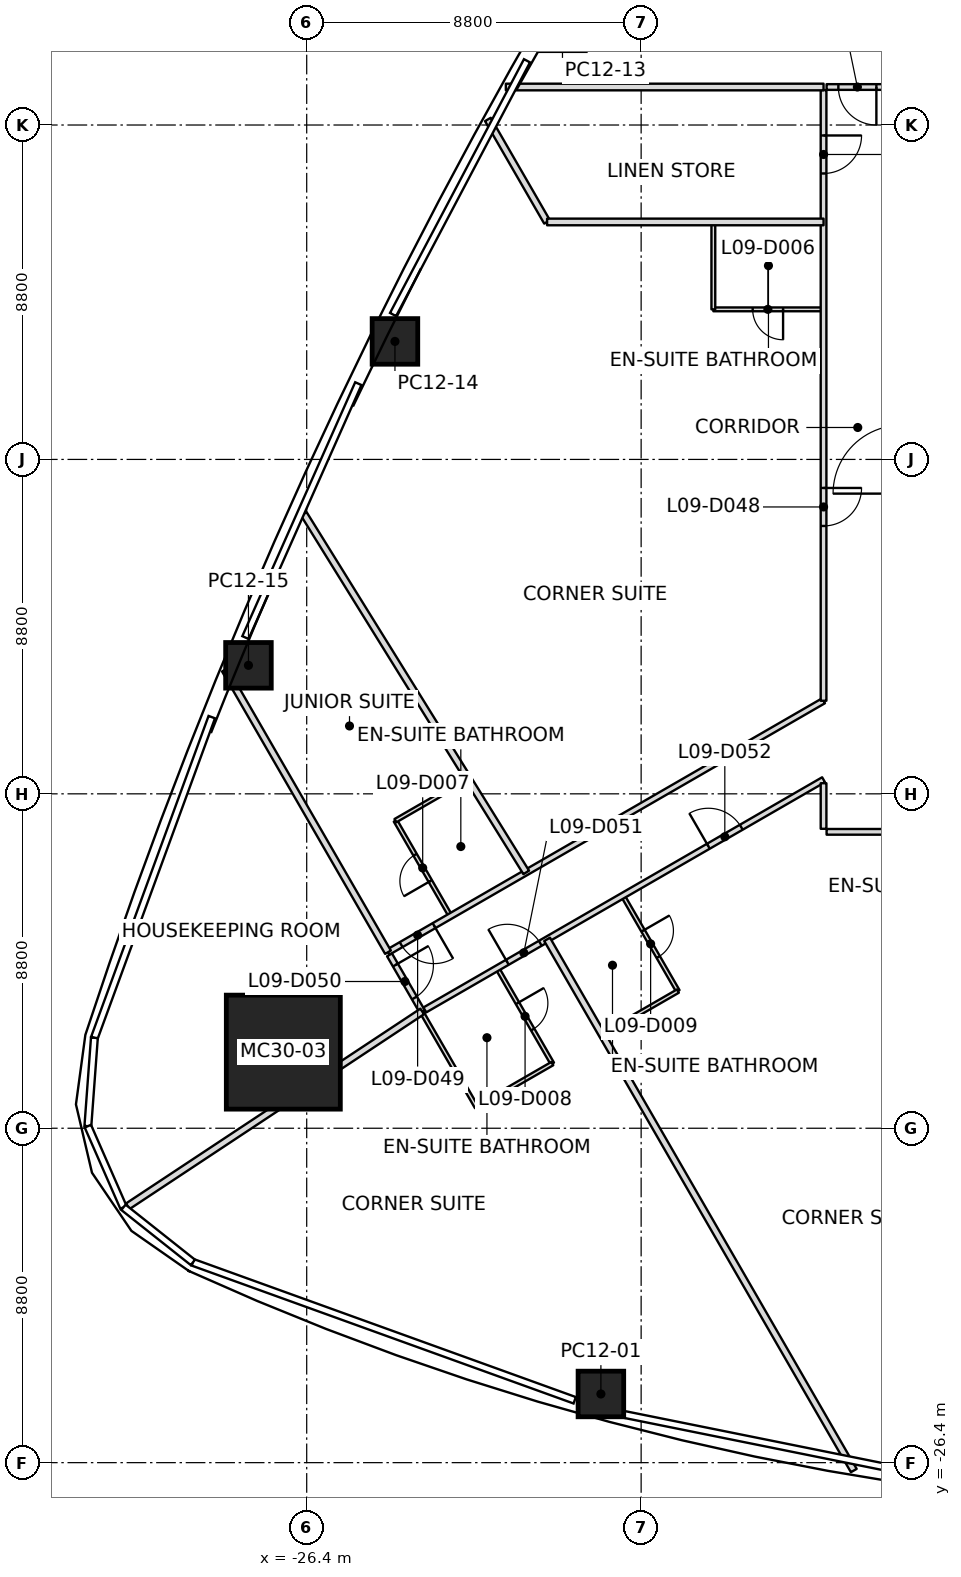
"""IFC4 building model, lengths in metres.
Left out: names, types, materials, properties, quantities, classifications, styles, units other than length and angle.
Written with IfcOpenShell. Run it as: python <this file> out.ifc"""

import sys

from ifc_helpers import new_model, si_unit, direction, frame, frame_2d, origin, origin_2d, place, context, subcontext, project, spatial, rectangle, extrude, clip, halfspace, element, fill, save


model = new_model("IFC4")
c1 = context("Model", 3, precision=1e-05, world=origin(), true_north=direction((0.0, 1.0)))
c2 = subcontext(c1, "Body", "Model", "MODEL_VIEW")
j1 = project(units=[si_unit("LENGTHUNIT", "METRE"), si_unit("PLANEANGLEUNIT", "RADIAN")], contexts=[c1])
p1 = place(None, origin())
s1 = spatial("IfcSite", under=j1, at=p1, CompositionType="ELEMENT")
p2 = place(p1, origin())
s2 = spatial("IfcBuilding", under=s1, at=p2, CompositionType="ELEMENT")
p3 = place(p2, frame((0.0, 0.0, 55.4)))
s3 = spatial("IfcBuildingStorey", under=s2, at=p3, CompositionType="ELEMENT", Elevation=55.4)
p4 = place(p3, frame((-27.015, -15.597, 0.0), z_axis=(0.030595822255, 0.017671724923, 0.999375607967), x_axis=(0.999531838243, -0.000540934199, -0.030591040022)))
e1 = element("IfcColumn", 1, at=p4, inside=s3, PredefinedType="COLUMN", context=c2, shape_type="SweptSolid", body=[
    extrude(rectangle(XDim=3.0, YDim=3.0, at=origin_2d()), origin(), (0.0, 0.0, 1.0), 3.702),
])
p5 = place(p3, frame((-18.659, -24.593, 0.0), z_axis=(0.018962740175, 0.175794991964, 0.984244144146), x_axis=(-0.964231408406, 0.26352619053, -0.028491015209)))
e2 = element("IfcColumn", 2, at=p5, inside=s3, PredefinedType="COLUMN", context=c2, shape_type="SweptSolid", body=[
    clip(clip(extrude(rectangle(XDim=1.2, YDim=1.2, at=origin_2d()), origin(), (0.0, 0.0, 1.0), 3.76), halfspace(frame((0.0, 0.0, 0.001)), True)), halfspace(frame((0.0, 0.0, 3.759)), False)),
])
p6 = place(p3, frame((-19.67, 11.356, 0.0), z_axis=(0.010688020009, -0.006201690622, 0.999923649716), x_axis=(0.499971440741, 0.866041891424, 2.7221193e-05)))
e3 = element("IfcColumn", 3, at=p6, inside=s3, PredefinedType="COLUMN", context=c2, shape_type="SweptSolid", body=[
    extrude(rectangle(XDim=1.2, YDim=1.2, at=origin_2d()), origin(), (0.0, 0.0, 1.0), 3.7),
])
p7 = place(p3, frame((-24.078, 3.105, 0.0), z_axis=(0.0153715921, 0.00230903744, 0.999879183953), x_axis=(0.441818489924, 0.897060674508, -0.00886387119)))
e4 = element("IfcColumn", 4, at=p7, inside=s3, PredefinedType="COLUMN", context=c2, shape_type="SweptSolid", body=[
    extrude(rectangle(XDim=1.2, YDim=1.2, at=origin_2d()), origin(), (0.0, 0.0, 1.0), 3.701),
])
p8 = place(p3, frame((-27.933, -5.418, 0.0), z_axis=(0.019459371732, 0.011015983319, 0.999749959221), x_axis=(0.381749906574, 0.924097828084, -0.017612863535)))
e5 = element("IfcColumn", 5, at=p8, inside=s3, PredefinedType="COLUMN", context=c2, shape_type="SweptSolid", body=[
    extrude(rectangle(XDim=1.2, YDim=1.2, at=origin_2d()), origin(), (0.0, 0.0, 1.0), 3.701),
])
p9 = place(p3, frame((-31.108, -19.653, 0.0), z_axis=(0.0, 0.0, 1.0), x_axis=(0.833961909898, 0.55182201192, 0.0)))
e6 = element("IfcWall", 6, at=p9, inside=s3, PredefinedType="PARTITIONING", context=c2, shape_type="SweptSolid", body=[
    extrude(rectangle(XDim=9.289, YDim=0.175, at=frame_2d((4.645, 0.0))), origin(), (0.0, 0.0, 1.0), 2.784),
])
p10 = place(p3, frame((-24.261, -12.968, 0.0), z_axis=(0.0, 0.0, 1.0), x_axis=(-0.500006467099, 0.866021669971, 0.0)))
e7 = element("IfcWall", 7, at=p10, inside=s3, PredefinedType="PARTITIONING", context=c2, shape_type="SweptSolid", body=[
    extrude(rectangle(XDim=8.582, YDim=0.175, at=frame_2d((4.291, 0.0))), origin(), (0.0, 0.0, 1.0), 2.784),
])
p11 = place(p3, frame((-20.624, -10.868, 0.0), z_axis=(0.0, 0.0, 1.0), x_axis=(-0.527163606433, 0.849763809569, 0.0)))
e8 = element("IfcWall", 8, at=p11, inside=s3, PredefinedType="PARTITIONING", context=c2, shape_type="SweptSolid", body=[
    extrude(rectangle(XDim=11.103, YDim=0.175, at=frame_2d((5.551, 0.0))), origin(), (0.0, 0.0, 1.0), 2.784),
])
p12 = place(p3, frame((-21.632, 8.947, 0.0), z_axis=(0.0, 0.0, 1.0), x_axis=(0.499991586322, -0.866030261369, 0.0)))
e9 = element("IfcWall", 9, at=p12, inside=s3, PredefinedType="PARTITIONING", context=c2, shape_type="SweptSolid", body=[
    extrude(rectangle(XDim=3.115, YDim=0.175, at=frame_2d((1.557, 0.0))), origin(), (0.0, 0.0, 1.0), 2.784),
])
p13 = place(p3, frame((-20.075, 6.249, 0.0), z_axis=(0.0, 0.0, 1.0), x_axis=(1.0, 0.0, 0.0)))
e10 = element("IfcWall", 10, at=p13, inside=s3, PredefinedType="PARTITIONING", context=c2, shape_type="SweptSolid", body=[
    extrude(rectangle(XDim=7.275, YDim=0.175, at=frame_2d((3.637, 0.0))), origin(), (0.0, 0.0, 1.0), 2.943),
])
p14 = place(p3, frame((-12.8, 9.8, 0.0), z_axis=(0.0, 0.0, 1.0), x_axis=(-1.0, 0.0, 0.0)))
e11 = element("IfcWall", 11, at=p14, inside=s3, PredefinedType="PARTITIONING", context=c2, shape_type="SweptSolid", body=[
    extrude(rectangle(XDim=8.36, YDim=0.175, at=frame_2d((4.18, 0.0))), origin(), (0.0, 0.0, 1.0), 2.784),
])
p15 = place(p3, frame((-20.075, -12.629, 0.0), z_axis=(0.0, 0.0, 1.0), x_axis=(0.499997848404, -0.866026646006, 0.0)))
e12 = element("IfcWall", 12, at=p15, inside=s3, PredefinedType="PARTITIONING", context=c2, shape_type="SweptSolid", body=[
    extrude(rectangle(XDim=16.141, YDim=0.175, at=frame_2d((8.07, 0.0))), origin(), (0.0, 0.0, 1.0), 2.784),
])
p16 = place(p3, frame((-12.8, -6.351, 0.0), z_axis=(0.0, 0.0, 1.0), x_axis=(-0.866018462269, -0.500012022864, 0.0)))
e13 = element("IfcWall", 13, at=p16, inside=s3, PredefinedType="PARTITIONING", context=c2, shape_type="SweptSolid", body=[
    extrude(rectangle(XDim=13.234, YDim=0.15, at=frame_2d((6.617, 0.0))), origin(), (0.0, 0.0, 1.0), 2.797),
])
p17 = place(p16, frame((11.834, 0.0, 0.0)))
e14 = element("IfcOpeningElement", 14, at=p17, cuts=e13, PredefinedType="OPENING", context=c2, shape_type="SweptSolid", body=[
    extrude(rectangle(XDim=1.0, YDim=2.1, at=frame_2d((0.5, 1.05))), frame((0.0, 0.075, 0.0), z_axis=(0.0, -1.0, 0.0), x_axis=(1.0, 0.0, 0.0)), (0.0, 0.0, 1.0), 0.15),
])
p18 = place(p3, frame((-24.221, -13.037, 0.0), z_axis=(0.0, 0.0, 1.0), x_axis=(0.499955923987, -0.866050849587, 0.0)))
e15 = element("IfcWall", 15, at=p18, inside=s3, PredefinedType="PARTITIONING", context=c2, shape_type="SweptSolid", body=[
    extrude(rectangle(XDim=1.72, YDim=0.15, at=frame_2d((0.86, 0.0))), origin(), (0.0, 0.0, 1.0), 2.797),
])
p19 = place(p18, frame((0.31, 0.0, 0.0)))
e16 = element("IfcOpeningElement", 16, at=p19, cuts=e15, PredefinedType="OPENING", context=c2, shape_type="SweptSolid", body=[
    extrude(rectangle(XDim=1.0, YDim=2.1, at=frame_2d((0.5, 1.05))), frame((0.0, 0.075, 0.0), z_axis=(0.0, -1.0, 0.0), x_axis=(1.0, 0.0, 0.0)), (0.0, 0.0, 1.0), 0.15),
])
p20 = place(p3, frame((-23.292, -14.487, 0.0), z_axis=(0.0, 0.0, 1.0), x_axis=(0.866017117934, 0.50001435124, 0.0)))
e17 = element("IfcWall", 17, at=p20, inside=s3, PredefinedType="PARTITIONING", context=c2, shape_type="SweptSolid", body=[
    extrude(rectangle(XDim=12.115, YDim=0.15, at=frame_2d((6.058, 0.0))), origin(), (0.0, 0.0, 1.0), 2.797),
])
p21 = place(p20, frame((2.507, 0.0, 0.0)))
e18 = element("IfcOpeningElement", 18, at=p21, cuts=e17, PredefinedType="OPENING", context=c2, shape_type="SweptSolid", body=[
    extrude(rectangle(XDim=1.0, YDim=2.1, at=frame_2d((0.5, 1.05))), frame((0.0, 0.075, 0.0), z_axis=(0.0, -1.0, 0.0), x_axis=(1.0, 0.0, 0.0)), (0.0, 0.0, 1.0), 0.15),
])
p22 = place(p20, frame((8.615, 0.0, 0.0)))
e19 = element("IfcOpeningElement", 19, at=p22, cuts=e17, PredefinedType="OPENING", context=c2, shape_type="SweptSolid", body=[
    extrude(rectangle(XDim=1.0, YDim=2.1, at=frame_2d((0.5, 1.05))), frame((0.0, 0.075, 0.0), z_axis=(0.0, -1.0, 0.0), x_axis=(1.0, 0.0, 0.0)), (0.0, 0.0, 1.0), 0.15),
])
p23 = place(p3, frame((-12.8, -8.521, 0.0), z_axis=(0.0, 0.0, 1.0), x_axis=(0.0, -1.0, 0.0)))
e20 = element("IfcWall", 20, at=p23, inside=s3, PredefinedType="PARTITIONING", context=c2, shape_type="SweptSolid", body=[
    extrude(rectangle(XDim=1.199, YDim=0.15, at=frame_2d((0.6, 0.0))), origin(), (0.0, 0.0, 1.0), 2.797),
])
p24 = place(p3, frame((-12.8, 9.72, 0.0), z_axis=(0.0, 0.0, 1.0), x_axis=(0.0, -1.0, 0.0)))
e21 = element("IfcWall", 21, at=p24, inside=s3, PredefinedType="PARTITIONING", context=c2, shape_type="SweptSolid", body=[
    extrude(rectangle(XDim=16.071, YDim=0.15, at=frame_2d((8.035, 0.0))), origin(), (0.0, 0.0, 1.0), 2.867),
])
p25 = place(p24, frame((1.195, 0.0, 0.0)))
e22 = element("IfcOpeningElement", 22, at=p25, cuts=e21, PredefinedType="OPENING", context=c2, shape_type="SweptSolid", body=[
    extrude(rectangle(XDim=1.0, YDim=2.1, at=frame_2d((0.5, 1.05))), frame((0.0, 0.075, 0.0), z_axis=(0.0, -1.0, 0.0), x_axis=(1.0, 0.0, 0.0)), (0.0, 0.0, 1.0), 0.15),
])
p26 = place(p24, frame((10.471, 0.0, 0.0)))
e23 = element("IfcOpeningElement", 23, at=p26, cuts=e21, PredefinedType="OPENING", context=c2, shape_type="SweptSolid", body=[
    extrude(rectangle(XDim=1.0, YDim=2.1, at=frame_2d((0.5, 1.05))), frame((0.0, 0.075, 0.0), z_axis=(0.0, -1.0, 0.0), x_axis=(1.0, 0.0, 0.0)), (0.0, 0.0, 1.0), 0.15),
])
p27 = place(p3, frame((-12.72, -9.8, 0.0), z_axis=(0.0, 0.0, 1.0), x_axis=(1.0, 0.0, 0.0)))
e24 = element("IfcWall", 24, at=p27, inside=s3, PredefinedType="PARTITIONING", context=c2, shape_type="SweptSolid", body=[
    extrude(rectangle(XDim=25.44, YDim=0.15, at=frame_2d((12.72, 0.0))), origin(), (0.0, 0.0, 1.0), 2.797),
])
p28 = place(p27, frame((7.32, 0.0, 0.0)))
e25 = element("IfcOpeningElement", 25, at=p28, cuts=e24, PredefinedType="OPENING", context=c2, shape_type="SweptSolid", body=[
    extrude(rectangle(XDim=1.0, YDim=2.1, at=frame_2d((0.5, 1.05))), frame((0.0, 0.075, 0.0), z_axis=(0.0, -1.0, 0.0), x_axis=(1.0, 0.0, 0.0)), (0.0, 0.0, 1.0), 0.15),
])
p29 = place(p27, frame((11.52, 0.0, 0.0)))
e26 = element("IfcOpeningElement", 26, at=p29, cuts=e24, PredefinedType="OPENING", context=c2, shape_type="SweptSolid", body=[
    extrude(rectangle(XDim=1.0, YDim=2.1, at=frame_2d((0.5, 1.05))), frame((0.0, 0.075, 0.0), z_axis=(0.0, -1.0, 0.0), x_axis=(1.0, 0.0, 0.0)), (0.0, 0.0, 1.0), 0.15),
])
p30 = place(p27, frame((15.72, 0.0, 0.0)))
e27 = element("IfcOpeningElement", 27, at=p30, cuts=e24, PredefinedType="OPENING", context=c2, shape_type="SweptSolid", body=[
    extrude(rectangle(XDim=1.0, YDim=2.1, at=frame_2d((0.5, 1.05))), frame((0.0, 0.075, 0.0), z_axis=(0.0, -1.0, 0.0), x_axis=(1.0, 0.0, 0.0)), (0.0, 0.0, 1.0), 0.15),
])
p31 = place(p27, frame((19.92, 0.0, 0.0)))
e28 = element("IfcOpeningElement", 28, at=p31, cuts=e24, PredefinedType="OPENING", context=c2, shape_type="SweptSolid", body=[
    extrude(rectangle(XDim=1.0, YDim=2.1, at=frame_2d((0.5, 1.05))), frame((0.0, 0.075, 0.0), z_axis=(0.0, -1.0, 0.0), x_axis=(1.0, 0.0, 0.0)), (0.0, 0.0, 1.0), 0.15),
])
p32 = place(p3, frame((-4.48, 9.8, 0.0), z_axis=(0.0, 0.0, 1.0), x_axis=(-1.0, 0.0, 0.0)))
e29 = element("IfcWall", 29, at=p32, inside=s3, PredefinedType="PARTITIONING", context=c2, shape_type="SweptSolid", body=[
    extrude(rectangle(XDim=8.24, YDim=0.15, at=frame_2d((4.12, 0.0))), origin(), (0.0, 0.0, 1.0), 2.943),
])
p33 = place(p32, frame((6.93, 0.0, 0.0)))
e30 = element("IfcOpeningElement", 30, at=p33, cuts=e29, PredefinedType="OPENING", context=c2, shape_type="SweptSolid", body=[
    extrude(rectangle(XDim=1.0, YDim=2.1, at=frame_2d((0.5, 1.05))), frame((0.0, 0.075, 0.0), z_axis=(0.0, -1.0, 0.0), x_axis=(1.0, 0.0, 0.0)), (0.0, 0.0, 1.0), 0.15),
])
p34 = place(p3, frame((-21.372, -13.413, 0.0), z_axis=(0.0, 0.0, 1.0), x_axis=(0.499999802827, -0.866025517622, 0.0)))
e31 = element("IfcWall", 31, at=p34, inside=s3, PredefinedType="PARTITIONING", context=c2, shape_type="SweptSolid", body=[
    extrude(rectangle(XDim=2.87, YDim=0.1, at=frame_2d((1.435, 0.0))), origin(), (0.0, 0.0, 1.0), 3.0),
])
p35 = place(p34, frame((1.035, 0.0, 0.0)))
e32 = element("IfcOpeningElement", 32, at=p35, cuts=e31, PredefinedType="OPENING", context=c2, shape_type="SweptSolid", body=[
    extrude(rectangle(XDim=0.8, YDim=2.1, at=frame_2d((0.4, 1.05))), frame((0.0, 0.05, 0.0), z_axis=(0.0, -1.0, 0.0), x_axis=(1.0, 0.0, 0.0)), (0.0, 0.0, 1.0), 0.1),
])
p36 = place(p3, frame((-19.937, -15.898, 0.0), z_axis=(0.0, 0.0, 1.0), x_axis=(-0.86602648383, -0.499998129301, 0.0)))
e33 = element("IfcWall", 33, at=p36, inside=s3, PredefinedType="PARTITIONING", context=c2, shape_type="SweptSolid", body=[
    extrude(rectangle(XDim=2.3, YDim=0.1, at=frame_2d((1.15, 0.0))), origin(), (0.0, 0.0, 1.0), 3.0),
])
p37 = place(p3, frame((-21.928, -17.048, 0.0), z_axis=(0.0, 0.0, 1.0), x_axis=(-0.500036638401, 0.866004249561, 0.0)))
e34 = element("IfcWall", 34, at=p37, inside=s3, PredefinedType="PARTITIONING", context=c2, shape_type="SweptSolid", body=[
    extrude(rectangle(XDim=2.87, YDim=0.1, at=frame_2d((1.435, 0.0))), origin(), (0.0, 0.0, 1.0), 3.0),
])
p38 = place(p3, frame((-22.631, -11.992, 0.0), z_axis=(0.0, 0.0, 1.0), x_axis=(-0.499999802827, 0.866025517622, 0.0)))
e35 = element("IfcWall", 35, at=p38, inside=s3, PredefinedType="PARTITIONING", context=c2, shape_type="SweptSolid", body=[
    extrude(rectangle(XDim=2.87, YDim=0.1, at=frame_2d((1.435, 0.0))), origin(), (0.0, 0.0, 1.0), 3.0),
])
p39 = place(p38, frame((1.035, 0.0, 0.0)))
e36 = element("IfcOpeningElement", 36, at=p39, cuts=e35, PredefinedType="OPENING", context=c2, shape_type="SweptSolid", body=[
    extrude(rectangle(XDim=0.8, YDim=2.1, at=frame_2d((0.4, 1.05))), frame((0.0, 0.05, 0.0), z_axis=(0.0, -1.0, 0.0), x_axis=(1.0, 0.0, 0.0)), (0.0, 0.0, 1.0), 0.1),
])
p40 = place(p3, frame((-24.066, -9.506, 0.0), z_axis=(0.0, 0.0, 1.0), x_axis=(0.866044110172, 0.499967598186, 0.0)))
e37 = element("IfcWall", 37, at=p40, inside=s3, PredefinedType="PARTITIONING", context=c2, shape_type="SweptSolid", body=[
    extrude(rectangle(XDim=2.27, YDim=0.1, at=frame_2d((1.135, 0.0))), origin(), (0.0, 0.0, 1.0), 3.0),
])
p41 = place(p3, frame((-18.068, -11.505, 0.0), z_axis=(0.0, 0.0, 1.0), x_axis=(0.500036638401, -0.866004249561, 0.0)))
e38 = element("IfcWall", 38, at=p41, inside=s3, PredefinedType="PARTITIONING", context=c2, shape_type="SweptSolid", body=[
    extrude(rectangle(XDim=2.87, YDim=0.1, at=frame_2d((1.435, 0.0))), origin(), (0.0, 0.0, 1.0), 2.797),
])
p42 = place(p41, frame((1.035, 0.0, 0.0)))
e39 = element("IfcOpeningElement", 39, at=p42, cuts=e38, PredefinedType="OPENING", context=c2, shape_type="SweptSolid", body=[
    extrude(rectangle(XDim=0.8, YDim=2.1, at=frame_2d((0.4, 1.05))), frame((0.0, 0.05, 0.0), z_axis=(0.0, -1.0, 0.0), x_axis=(1.0, 0.0, 0.0)), (0.0, 0.0, 1.0), 0.1),
])
p43 = place(p3, frame((-16.633, -13.991, 0.0), z_axis=(0.0, 0.0, 1.0), x_axis=(-0.866017224141, -0.500014167291, 0.0)))
e40 = element("IfcWall", 40, at=p43, inside=s3, PredefinedType="PARTITIONING", context=c2, shape_type="SweptSolid", body=[
    extrude(rectangle(XDim=2.27, YDim=0.1, at=frame_2d((1.135, 0.0))), origin(), (0.0, 0.0, 1.0), 3.0),
])
p44 = place(p3, frame((-12.83, 3.949, 0.0), z_axis=(0.0, 0.0, 1.0), x_axis=(-1.0, 0.0, 0.0)))
e41 = element("IfcWall", 41, at=p44, inside=s3, PredefinedType="PARTITIONING", context=c2, shape_type="SweptSolid", body=[
    extrude(rectangle(XDim=2.87, YDim=0.1, at=frame_2d((1.435, 0.0))), origin(), (0.0, 0.0, 1.0), 2.943),
])
p45 = place(p44, frame((1.035, 0.0, 0.0)))
e42 = element("IfcOpeningElement", 42, at=p45, cuts=e41, PredefinedType="OPENING", context=c2, shape_type="SweptSolid", body=[
    extrude(rectangle(XDim=0.8, YDim=2.1, at=frame_2d((0.4, 1.05))), frame((0.0, 0.05, 0.0), z_axis=(0.0, -1.0, 0.0), x_axis=(1.0, 0.0, 0.0)), (0.0, 0.0, 1.0), 0.1),
])
p46 = place(p3, frame((-15.7, 3.949, 0.0), z_axis=(0.0, 0.0, 1.0), x_axis=(0.0, 1.0, 0.0)))
e43 = element("IfcWall", 43, at=p46, inside=s3, PredefinedType="PARTITIONING", context=c2, shape_type="SweptSolid", body=[
    extrude(rectangle(XDim=2.27, YDim=0.1, at=frame_2d((1.135, 0.0))), origin(), (0.0, 0.0, 1.0), 2.943),
])
p47 = place(p33, origin())
e44 = element("IfcDoor", 44, at=p47, inside=s3, OperationType="SINGLE_SWING_RIGHT", PredefinedType="DOOR", context=c2, shape_type="SweptSolid", body=[
    extrude(rectangle(XDim=1.0, YDim=2.1, at=frame_2d((0.5, 1.05))), frame((0.0, 0.025, 0.0), z_axis=(0.0, -1.0, 0.0), x_axis=(1.0, 0.0, 0.0)), (0.0, 0.0, 1.0), 0.05),
])
fill(e30, e44)
p48 = place(p25, origin())
e45 = element("IfcDoor", 45, at=p48, inside=s3, OperationType="SINGLE_SWING_RIGHT", PredefinedType="DOOR", context=c2, shape_type="SweptSolid", body=[
    extrude(rectangle(XDim=1.0, YDim=2.1, at=frame_2d((0.5, 1.05))), frame((0.0, 0.025, 0.0), z_axis=(0.0, -1.0, 0.0), x_axis=(1.0, 0.0, 0.0)), (0.0, 0.0, 1.0), 0.05),
])
fill(e22, e45)
p49 = place(p26, origin())
e46 = element("IfcDoor", 46, at=p49, inside=s3, OperationType="SINGLE_SWING_LEFT", PredefinedType="DOOR", context=c2, shape_type="SweptSolid", body=[
    extrude(rectangle(XDim=1.0, YDim=2.1, at=frame_2d((0.5, 1.05))), frame((0.0, 0.025, 0.0), z_axis=(0.0, -1.0, 0.0), x_axis=(1.0, 0.0, 0.0)), (0.0, 0.0, 1.0), 0.05),
])
fill(e23, e46)
p50 = place(p45, origin())
e47 = element("IfcDoor", 47, at=p50, inside=s3, OperationType="SINGLE_SWING_RIGHT", PredefinedType="DOOR", context=c2, shape_type="SweptSolid", body=[
    extrude(rectangle(XDim=0.8, YDim=2.1, at=frame_2d((0.4, 1.05))), frame((0.0, 0.025, 0.0), z_axis=(0.0, -1.0, 0.0), x_axis=(1.0, 0.0, 0.0)), (0.0, 0.0, 1.0), 0.05),
])
fill(e42, e47)
p51 = place(p17, origin())
e48 = element("IfcDoor", 48, at=p51, inside=s3, OperationType="SINGLE_SWING_LEFT", PredefinedType="DOOR", context=c2, shape_type="SweptSolid", body=[
    extrude(rectangle(XDim=1.0, YDim=2.1, at=frame_2d((0.5, 1.05))), frame((0.0, 0.025, 0.0), z_axis=(0.0, -1.0, 0.0), x_axis=(1.0, 0.0, 0.0)), (0.0, 0.0, 1.0), 0.05),
])
fill(e14, e48)
p52 = place(p39, origin())
e49 = element("IfcDoor", 49, at=p52, inside=s3, OperationType="SINGLE_SWING_LEFT", PredefinedType="DOOR", context=c2, shape_type="SweptSolid", body=[
    extrude(rectangle(XDim=0.8, YDim=2.1, at=frame_2d((0.4, 1.05))), frame((0.0, 0.025, 0.0), z_axis=(0.0, -1.0, 0.0), x_axis=(1.0, 0.0, 0.0)), (0.0, 0.0, 1.0), 0.05),
])
fill(e36, e49)
p53 = place(p19, origin())
e50 = element("IfcDoor", 50, at=p53, inside=s3, OperationType="SINGLE_SWING_LEFT", PredefinedType="DOOR", context=c2, shape_type="SweptSolid", body=[
    extrude(rectangle(XDim=1.0, YDim=2.1, at=frame_2d((0.5, 1.05))), frame((0.0, 0.025, 0.0), z_axis=(0.0, -1.0, 0.0), x_axis=(1.0, 0.0, 0.0)), (0.0, 0.0, 1.0), 0.05),
])
fill(e16, e50)
p54 = place(p21, origin())
e51 = element("IfcDoor", 51, at=p54, inside=s3, OperationType="SINGLE_SWING_LEFT", PredefinedType="DOOR", context=c2, shape_type="SweptSolid", body=[
    extrude(rectangle(XDim=1.0, YDim=2.1, at=frame_2d((0.5, 1.05))), frame((0.0, 0.025, 0.0), z_axis=(0.0, -1.0, 0.0), x_axis=(1.0, 0.0, 0.0)), (0.0, 0.0, 1.0), 0.05),
])
fill(e18, e51)
p55 = place(p35, origin())
e52 = element("IfcDoor", 52, at=p55, inside=s3, OperationType="SINGLE_SWING_LEFT", PredefinedType="DOOR", context=c2, shape_type="SweptSolid", body=[
    extrude(rectangle(XDim=0.8, YDim=2.1, at=frame_2d((0.4, 1.05))), frame((0.0, 0.025, 0.0), z_axis=(0.0, -1.0, 0.0), x_axis=(1.0, 0.0, 0.0)), (0.0, 0.0, 1.0), 0.05),
])
fill(e32, e52)
p56 = place(p22, origin())
e53 = element("IfcDoor", 53, at=p56, inside=s3, OperationType="SINGLE_SWING_LEFT", PredefinedType="DOOR", context=c2, shape_type="SweptSolid", body=[
    extrude(rectangle(XDim=1.0, YDim=2.1, at=frame_2d((0.5, 1.05))), frame((0.0, 0.025, 0.0), z_axis=(0.0, -1.0, 0.0), x_axis=(1.0, 0.0, 0.0)), (0.0, 0.0, 1.0), 0.05),
])
fill(e19, e53)
p57 = place(p42, origin())
e54 = element("IfcDoor", 54, at=p57, inside=s3, OperationType="SINGLE_SWING_RIGHT", PredefinedType="DOOR", context=c2, shape_type="SweptSolid", body=[
    extrude(rectangle(XDim=0.8, YDim=2.1, at=frame_2d((0.4, 1.05))), frame((0.0, 0.025, 0.0), z_axis=(0.0, -1.0, 0.0), x_axis=(1.0, 0.0, 0.0)), (0.0, 0.0, 1.0), 0.05),
])
fill(e39, e54)
save(model, sys.argv[1])
